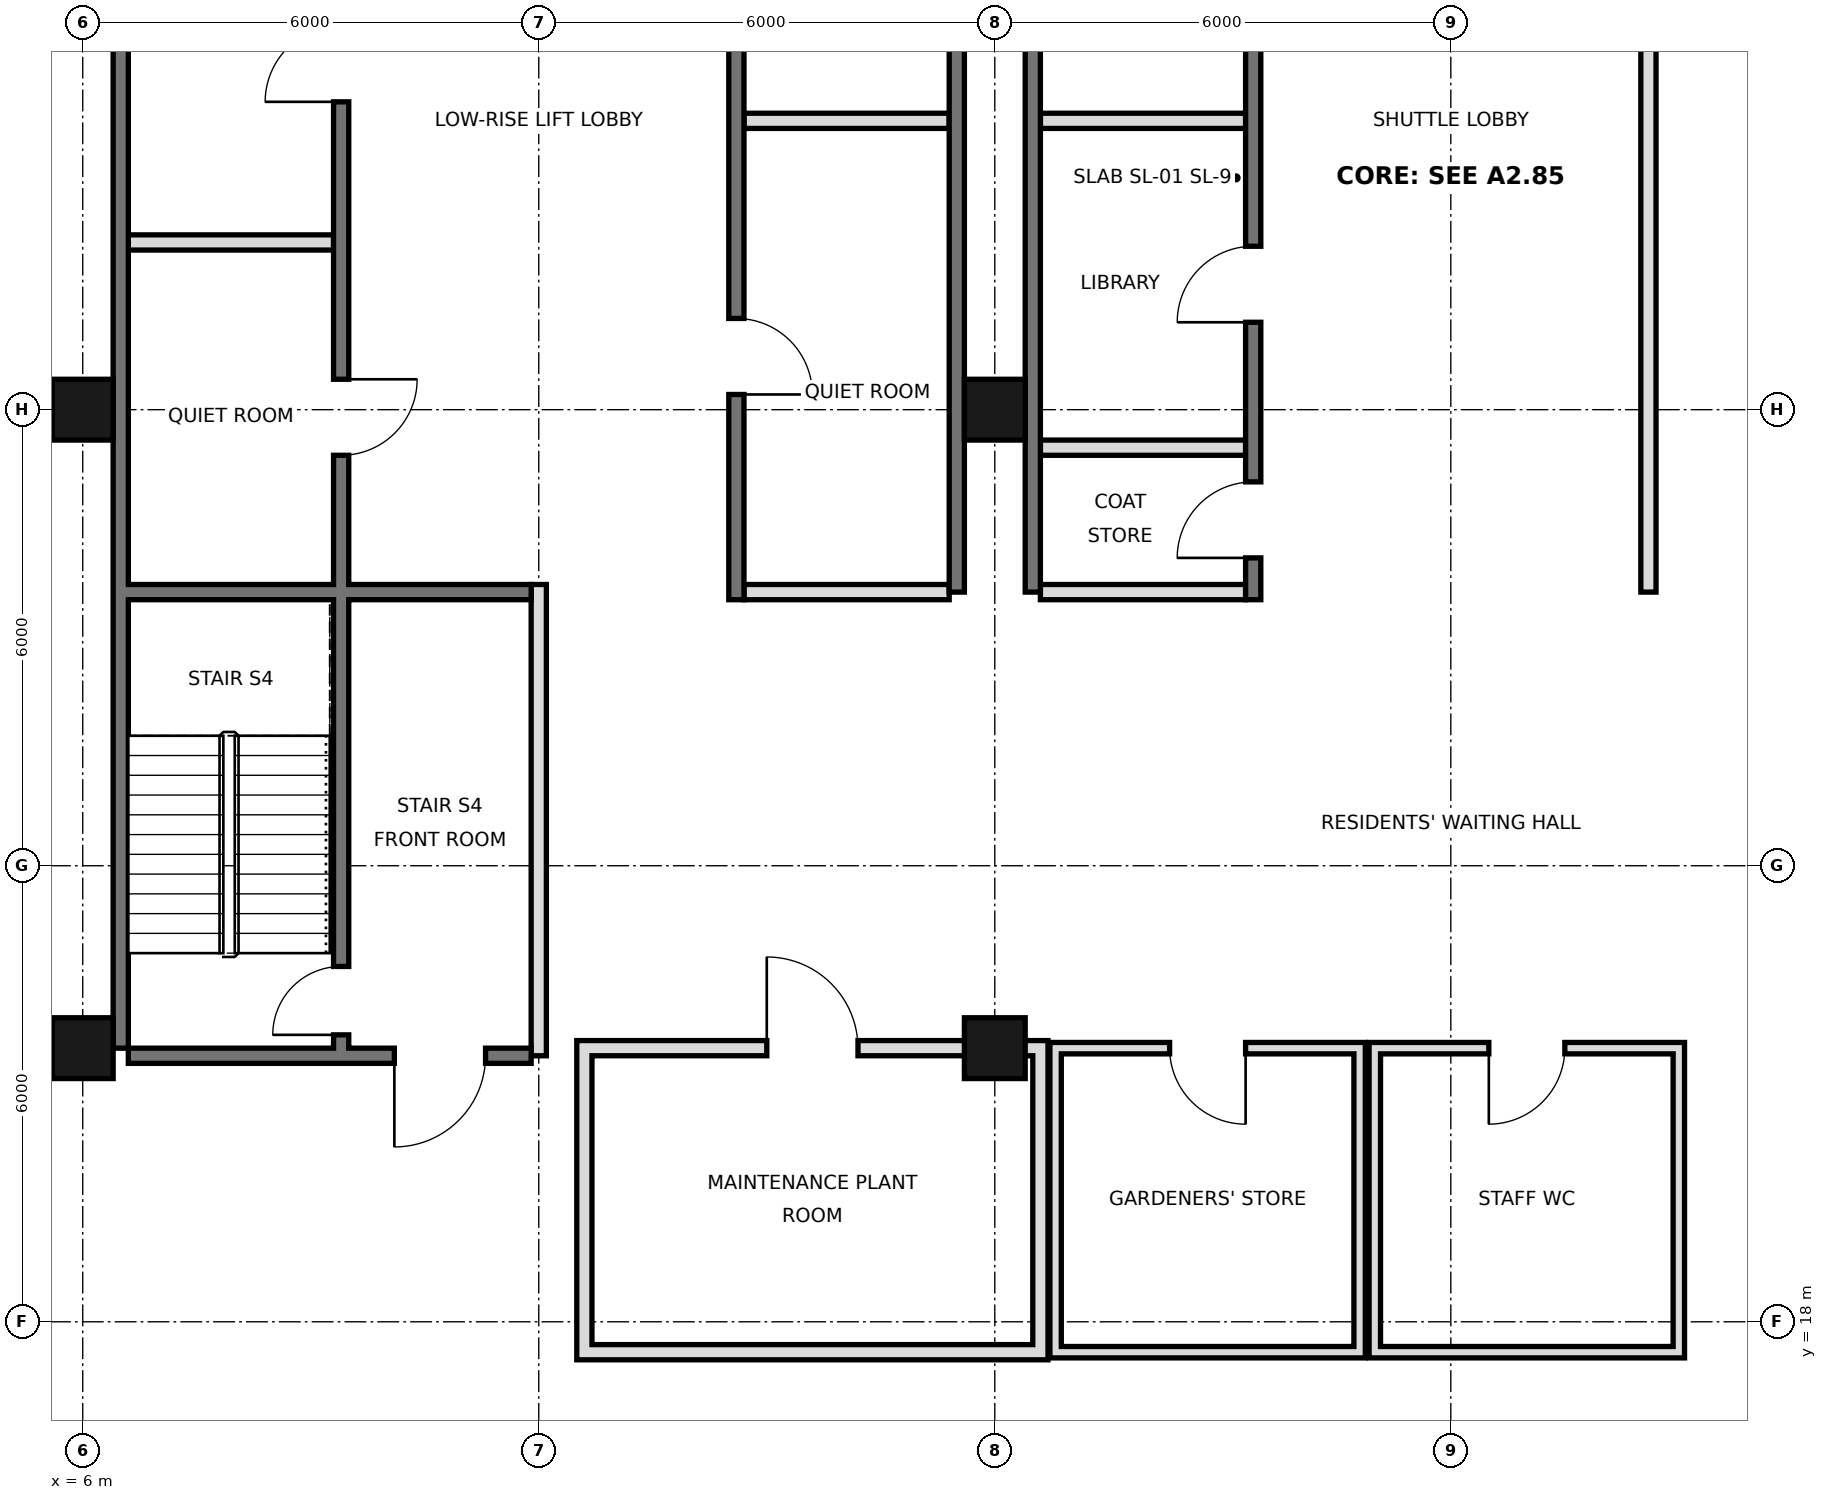
"""IFC4 building model, lengths in metres.
Left out: names, types, materials, properties, quantities, classifications, styles, units other than length and angle.
Written with IfcOpenShell. Run it as: python <this file> out.ifc"""

import sys

from ifc_helpers import new_model, si_unit, direction, frame, frame_2d, origin, origin_2d, place, context, subcontext, project, spatial, rectangle, hollow_rectangle, extrude, element, fill, save


model = new_model("IFC4")
c1 = context("Model", 3, precision=1e-05, world=origin(), true_north=direction((0.0, 1.0)))
c2 = subcontext(c1, "Body", "Model", "MODEL_VIEW")
j1 = project(units=[si_unit("LENGTHUNIT", "METRE"), si_unit("PLANEANGLEUNIT", "RADIAN")], contexts=[c1])
p1 = place(None, origin())
s1 = spatial("IfcSite", under=j1, at=p1, CompositionType="ELEMENT")
p2 = place(p1, origin())
s2 = spatial("IfcBuilding", under=s1, at=p2, CompositionType="ELEMENT")
p3 = place(p2, frame((0.0, 0.0, 341.8)))
s3 = spatial("IfcBuildingStorey", under=s2, at=p3, CompositionType="ELEMENT", Elevation=341.8)
for number, where, z_axis, x_axis in (
    (1, (6.0, 21.6, 0.0), (0.0, 0.0, 1.0), (1.0, 0.0, 0.0)),
    (2, (6.0, 30.0, 0.0), (0.0, 0.0, 1.0), (1.0, 0.0, 0.0)),
    (3, (18.0, 21.6, 0.0), (0.0, 0.0, 1.0), (1.0, 0.0, 0.0)),
    (4, (18.0, 30.0, 0.0), (0.0, 0.0, 1.0), (1.0, 0.0, 0.0)),
):
    element("IfcColumn", number, at=place(p3, frame(where, z_axis=z_axis, x_axis=x_axis)), inside=s3, PredefinedType="COLUMN", context=c2, shape_type="SweptSolid", body=[
        extrude(hollow_rectangle(XDim=0.8, YDim=0.8, WallThickness=0.025, at=origin_2d()), origin(), (0.0, 0.0, 1.0), 4.0),
    ])
for number, where, z_axis, x_axis in (
    (5, (12.6, 17.5, 0.0), (0.0, 0.0, 1.0), (0.0, 1.0, 0.0)),
    (6, (18.6, 17.5, 0.0), (0.0, 0.0, 1.0), (0.0, 1.0, 0.0)),
):
    element("IfcWall", number, at=place(p3, frame(where, z_axis=z_axis, x_axis=x_axis)), inside=s3, PredefinedType="SOLIDWALL", context=c2, shape_type="SweptSolid", body=[
        extrude(rectangle(XDim=4.2, YDim=0.2, at=frame_2d((2.1, 0.0))), origin(), (0.0, 0.0, 1.0), 3.05),
    ])
for number, where, z_axis, x_axis in (
    (7, (18.8, 17.525, 0.0), (0.0, 0.0, 1.0), (0.0, 1.0, 0.0)),
    (8, (22.8, 17.525, 0.0), (0.0, 0.0, 1.0), (0.0, 1.0, 0.0)),
    (9, (23.0, 17.525, 0.0), (0.0, 0.0, 1.0), (0.0, 1.0, 0.0)),
    (10, (27.0, 17.525, 0.0), (0.0, 0.0, 1.0), (0.0, 1.0, 0.0)),
):
    element("IfcWall", number, at=place(p3, frame(where, z_axis=z_axis, x_axis=x_axis)), inside=s3, PredefinedType="PARTITIONING", context=c2, shape_type="SweptSolid", body=[
        extrude(rectangle(XDim=4.15, YDim=0.15, at=frame_2d((2.075, 0.0))), origin(), (0.0, 0.0, 1.0), 3.75),
    ])
p4 = place(p3, frame((12.7, 17.6, 0.0), z_axis=(0.0, 0.0, 1.0), x_axis=(1.0, 0.0, 0.0)))
e11 = element("IfcWall", 11, at=p4, inside=s3, PredefinedType="SOLIDWALL", context=c2, shape_type="SweptSolid", body=[
    extrude(rectangle(XDim=5.8, YDim=0.2, at=frame_2d((2.9, 0.0))), origin(), (0.0, 0.0, 1.0), 3.05),
])
for number, where, z_axis, x_axis in (
    (12, (18.875, 17.6, 0.0), (0.0, 0.0, 1.0), (1.0, 0.0, 0.0)),
    (13, (23.075, 17.6, 0.0), (0.0, 0.0, 1.0), (1.0, 0.0, 0.0)),
):
    element("IfcWall", number, at=place(p3, frame(where, z_axis=z_axis, x_axis=x_axis)), inside=s3, PredefinedType="PARTITIONING", context=c2, shape_type="SweptSolid", body=[
        extrude(rectangle(XDim=3.85, YDim=0.15, at=frame_2d((1.925, 0.0))), origin(), (0.0, 0.0, 1.0), 3.75),
    ])
p5 = place(p3, frame((12.7, 21.6, 0.0), z_axis=(0.0, 0.0, 1.0), x_axis=(1.0, 0.0, 0.0)))
e14 = element("IfcWall", 14, at=p5, inside=s3, PredefinedType="SOLIDWALL", context=c2, shape_type="SweptSolid", body=[
    extrude(rectangle(XDim=5.8, YDim=0.2, at=frame_2d((2.9, 0.0))), origin(), (0.0, 0.0, 1.0), 3.75),
])
p6 = place(p5, frame((2.3, 0.0, 0.0)))
e15 = element("IfcOpeningElement", 15, at=p6, cuts=e14, PredefinedType="OPENING", context=c2, shape_type="SweptSolid", body=[
    extrude(rectangle(XDim=1.2, YDim=2.4, at=frame_2d((0.6, 1.2))), frame((0.0, 0.11, 0.0), z_axis=(0.0, -1.0, 0.0), x_axis=(1.0, 0.0, 0.0)), (0.0, 0.0, 1.0), 0.22),
])
p7 = place(p3, frame((18.875, 21.6, 0.0), z_axis=(0.0, 0.0, 1.0), x_axis=(1.0, 0.0, 0.0)))
e16 = element("IfcWall", 16, at=p7, inside=s3, PredefinedType="PARTITIONING", context=c2, shape_type="SweptSolid", body=[
    extrude(rectangle(XDim=3.85, YDim=0.15, at=frame_2d((1.925, 0.0))), origin(), (0.0, 0.0, 1.0), 3.75),
])
p8 = place(p7, frame((1.425, 0.0, 0.0)))
e17 = element("IfcOpeningElement", 17, at=p8, cuts=e16, PredefinedType="OPENING", context=c2, shape_type="SweptSolid", body=[
    extrude(rectangle(XDim=1.0, YDim=2.4, at=frame_2d((0.5, 1.2))), frame((0.0, 0.085, 0.0), z_axis=(0.0, -1.0, 0.0), x_axis=(1.0, 0.0, 0.0)), (0.0, 0.0, 1.0), 0.17),
])
p9 = place(p3, frame((23.075, 21.6, 0.0), z_axis=(0.0, 0.0, 1.0), x_axis=(1.0, 0.0, 0.0)))
e18 = element("IfcWall", 18, at=p9, inside=s3, PredefinedType="PARTITIONING", context=c2, shape_type="SweptSolid", body=[
    extrude(rectangle(XDim=3.85, YDim=0.15, at=frame_2d((1.925, 0.0))), origin(), (0.0, 0.0, 1.0), 3.75),
])
p10 = place(p9, frame((1.425, 0.0, 0.0)))
e19 = element("IfcOpeningElement", 19, at=p10, cuts=e18, PredefinedType="OPENING", context=c2, shape_type="SweptSolid", body=[
    extrude(rectangle(XDim=1.0, YDim=2.4, at=frame_2d((0.5, 1.2))), frame((0.0, 0.085, 0.0), z_axis=(0.0, -1.0, 0.0), x_axis=(1.0, 0.0, 0.0)), (0.0, 0.0, 1.0), 0.17),
])
p11 = place(p3, frame((6.5, 21.6, 0.0), z_axis=(0.0, 0.0, 1.0), x_axis=(0.0, 1.0, 0.0)))
e20 = element("IfcWall", 20, at=p11, inside=s3, PredefinedType="SOLIDWALL", context=c2, shape_type="SweptSolid", body=[
    extrude(rectangle(XDim=23.5, YDim=0.2, at=frame_2d((11.75, 0.0))), origin(), (0.0, 0.0, 1.0), 3.75),
])
for number, where, z_axis, x_axis in (
    (21, (17.5, 27.6, 0.0), (0.0, 0.0, 1.0), (0.0, 1.0, 0.0)),
    (22, (18.5, 27.6, 0.0), (0.0, 0.0, 1.0), (0.0, 1.0, 0.0)),
):
    element("IfcWall", number, at=place(p3, frame(where, z_axis=z_axis, x_axis=x_axis)), inside=s3, PredefinedType="SOLIDWALL", context=c2, shape_type="SweptSolid", body=[
        extrude(rectangle(XDim=17.5, YDim=0.2, at=frame_2d((8.75, 0.0))), origin(), (0.0, 0.0, 1.0), 3.75),
    ])
p12 = place(p3, frame((12.0, 21.5, 0.0), z_axis=(0.0, 0.0, 1.0), x_axis=(0.0, 1.0, 0.0)))
e23 = element("IfcWall", 23, at=p12, inside=s3, PredefinedType="PARTITIONING", context=c2, shape_type="SweptSolid", body=[
    extrude(rectangle(XDim=6.2, YDim=0.2, at=frame_2d((3.1, 0.0))), origin(), (0.0, 0.0, 1.0), 3.75),
])
p13 = place(p3, frame((14.6, 27.5, 0.0), z_axis=(0.0, 0.0, 1.0), x_axis=(0.0, 1.0, 0.0)))
e24 = element("IfcWall", 24, at=p13, inside=s3, PredefinedType="SOLIDWALL", context=c2, shape_type="SweptSolid", body=[
    extrude(rectangle(XDim=17.5, YDim=0.2, at=frame_2d((8.75, 0.0))), origin(), (0.0, 0.0, 1.0), 3.75),
])
p14 = place(p13, frame((15.4, 0.0, 0.0)))
e25 = element("IfcOpeningElement", 25, at=p14, cuts=e24, PredefinedType="OPENING", context=c2, shape_type="SweptSolid", body=[
    extrude(rectangle(XDim=1.1, YDim=2.1, at=frame_2d((0.55, 1.05))), frame((0.0, 0.11, 0.0), z_axis=(0.0, -1.0, 0.0), x_axis=(1.0, 0.0, 0.0)), (0.0, 0.0, 1.0), 0.22),
])
p15 = place(p13, frame((2.7, 0.0, 0.0)))
e26 = element("IfcOpeningElement", 26, at=p15, cuts=e24, PredefinedType="OPENING", context=c2, shape_type="SweptSolid", body=[
    extrude(rectangle(XDim=1.0, YDim=2.1, at=frame_2d((0.5, 1.05))), frame((0.0, 0.11, 0.0), z_axis=(0.0, -1.0, 0.0), x_axis=(1.0, 0.0, 0.0)), (0.0, 0.0, 1.0), 0.22),
])
p16 = place(p3, frame((21.4, 27.5, 0.0), z_axis=(0.0, 0.0, 1.0), x_axis=(0.0, 1.0, 0.0)))
e27 = element("IfcWall", 27, at=p16, inside=s3, PredefinedType="SOLIDWALL", context=c2, shape_type="SweptSolid", body=[
    extrude(rectangle(XDim=17.5, YDim=0.2, at=frame_2d((8.75, 0.0))), origin(), (0.0, 0.0, 1.0), 3.75),
])
p17 = place(p16, frame((0.55, 0.0, 0.0)))
e28 = element("IfcOpeningElement", 28, at=p17, cuts=e27, PredefinedType="OPENING", context=c2, shape_type="SweptSolid", body=[
    extrude(rectangle(XDim=1.0, YDim=2.1, at=frame_2d((0.5, 1.05))), frame((0.0, 0.11, 0.0), z_axis=(0.0, -1.0, 0.0), x_axis=(1.0, 0.0, 0.0)), (0.0, 0.0, 1.0), 0.22),
])
p18 = place(p16, frame((3.65, 0.0, 0.0)))
e29 = element("IfcOpeningElement", 29, at=p18, cuts=e27, PredefinedType="OPENING", context=c2, shape_type="SweptSolid", body=[
    extrude(rectangle(XDim=1.0, YDim=2.1, at=frame_2d((0.5, 1.05))), frame((0.0, 0.11, 0.0), z_axis=(0.0, -1.0, 0.0), x_axis=(1.0, 0.0, 0.0)), (0.0, 0.0, 1.0), 0.22),
])
p19 = place(p16, frame((9.8, 0.0, 0.0)))
e30 = element("IfcOpeningElement", 30, at=p19, cuts=e27, PredefinedType="OPENING", context=c2, shape_type="SweptSolid", body=[
    extrude(rectangle(XDim=1.0, YDim=2.1, at=frame_2d((0.5, 1.05))), frame((0.0, 0.11, 0.0), z_axis=(0.0, -1.0, 0.0), x_axis=(1.0, 0.0, 0.0)), (0.0, 0.0, 1.0), 0.22),
])
p20 = place(p3, frame((26.6, 27.6, 0.0), z_axis=(0.0, 0.0, 1.0), x_axis=(0.0, 1.0, 0.0)))
e31 = element("IfcWall", 31, at=p20, inside=s3, PredefinedType="PARTITIONING", context=c2, shape_type="SweptSolid", body=[
    extrude(rectangle(XDim=17.4, YDim=0.2, at=frame_2d((8.7, 0.0))), origin(), (0.0, 0.0, 1.0), 3.75),
])
p21 = place(p20, frame((10.25, 0.0, 0.0)))
e32 = element("IfcOpeningElement", 32, at=p21, cuts=e31, PredefinedType="OPENING", context=c2, shape_type="SweptSolid", body=[
    extrude(rectangle(XDim=1.0, YDim=2.1, at=frame_2d((0.5, 1.05))), frame((0.0, 0.11, 0.0), z_axis=(0.0, -1.0, 0.0), x_axis=(1.0, 0.0, 0.0)), (0.0, 0.0, 1.0), 0.22),
])
p22 = place(p20, frame((14.475, 0.0, 0.0)))
e33 = element("IfcOpeningElement", 33, at=p22, cuts=e31, PredefinedType="OPENING", context=c2, shape_type="SweptSolid", body=[
    extrude(rectangle(XDim=1.0, YDim=2.1, at=frame_2d((0.5, 1.05))), frame((0.0, 0.11, 0.0), z_axis=(0.0, -1.0, 0.0), x_axis=(1.0, 0.0, 0.0)), (0.0, 0.0, 1.0), 0.22),
])
p23 = place(p3, frame((9.4, 21.5, 0.0), z_axis=(0.0, 0.0, 1.0), x_axis=(0.0, 1.0, 0.0)))
e34 = element("IfcWall", 34, at=p23, inside=s3, PredefinedType="SOLIDWALL", context=c2, shape_type="SweptSolid", body=[
    extrude(rectangle(XDim=23.5, YDim=0.2, at=frame_2d((11.75, 0.0))), origin(), (0.0, 0.0, 1.0), 3.75),
])
p24 = place(p23, frame((7.9, 0.0, 0.0)))
e35 = element("IfcOpeningElement", 35, at=p24, cuts=e34, PredefinedType="OPENING", context=c2, shape_type="SweptSolid", body=[
    extrude(rectangle(XDim=1.0, YDim=2.1, at=frame_2d((0.5, 1.05))), frame((0.0, 0.11, 0.0), z_axis=(0.0, -1.0, 0.0), x_axis=(1.0, 0.0, 0.0)), (0.0, 0.0, 1.0), 0.22),
])
p25 = place(p23, frame((12.55, 0.0, 0.0)))
e36 = element("IfcOpeningElement", 36, at=p25, cuts=e34, PredefinedType="OPENING", context=c2, shape_type="SweptSolid", body=[
    extrude(rectangle(XDim=1.0, YDim=2.1, at=frame_2d((0.5, 1.05))), frame((0.0, 0.11, 0.0), z_axis=(0.0, -1.0, 0.0), x_axis=(1.0, 0.0, 0.0)), (0.0, 0.0, 1.0), 0.22),
])
p26 = place(p23, frame((15.8, 0.0, 0.0)))
e37 = element("IfcOpeningElement", 37, at=p26, cuts=e34, PredefinedType="OPENING", context=c2, shape_type="SweptSolid", body=[
    extrude(rectangle(XDim=1.0, YDim=2.1, at=frame_2d((0.5, 1.05))), frame((0.0, 0.11, 0.0), z_axis=(0.0, -1.0, 0.0), x_axis=(1.0, 0.0, 0.0)), (0.0, 0.0, 1.0), 0.22),
])
p27 = place(p23, frame((0.275, 0.0, 0.0)))
e38 = element("IfcOpeningElement", 38, at=p27, cuts=e34, PredefinedType="OPENING", context=c2, shape_type="SweptSolid", body=[
    extrude(rectangle(XDim=0.9, YDim=2.1, at=frame_2d((0.45, 1.05))), frame((0.0, 0.11, 0.0), z_axis=(0.0, -1.0, 0.0), x_axis=(1.0, 0.0, 0.0)), (0.0, 0.0, 1.0), 0.22),
])
p28 = place(p3, frame((6.6, 21.5, 0.0), z_axis=(0.0, 0.0, 1.0), x_axis=(1.0, 0.0, 0.0)))
e39 = element("IfcWall", 39, at=p28, inside=s3, PredefinedType="SOLIDWALL", context=c2, shape_type="SweptSolid", body=[
    extrude(rectangle(XDim=5.3, YDim=0.2, at=frame_2d((2.65, 0.0))), origin(), (0.0, 0.0, 1.0), 3.75),
])
p29 = place(p28, frame((3.5, 0.0, 0.0)))
e40 = element("IfcOpeningElement", 40, at=p29, cuts=e39, PredefinedType="OPENING", context=c2, shape_type="SweptSolid", body=[
    extrude(rectangle(XDim=1.2, YDim=2.1, at=frame_2d((0.6, 1.05))), frame((0.0, 0.11, 0.0), z_axis=(0.0, -1.0, 0.0), x_axis=(1.0, 0.0, 0.0)), (0.0, 0.0, 1.0), 0.22),
])
for number, where, z_axis, x_axis in (
    (41, (14.7, 27.6, 0.0), (0.0, 0.0, 1.0), (1.0, 0.0, 0.0)),
    (42, (18.6, 27.6, 0.0), (0.0, 0.0, 1.0), (1.0, 0.0, 0.0)),
):
    element("IfcWall", number, at=place(p3, frame(where, z_axis=z_axis, x_axis=x_axis)), inside=s3, PredefinedType="PARTITIONING", context=c2, shape_type="SweptSolid", body=[
        extrude(rectangle(XDim=2.7, YDim=0.2, at=frame_2d((1.35, 0.0))), origin(), (0.0, 0.0, 1.0), 3.75),
    ])
p30 = place(p3, frame((6.6, 27.6, 0.0), z_axis=(0.0, 0.0, 1.0), x_axis=(1.0, 0.0, 0.0)))
e43 = element("IfcWall", 43, at=p30, inside=s3, PredefinedType="SOLIDWALL", context=c2, shape_type="SweptSolid", body=[
    extrude(rectangle(XDim=5.3, YDim=0.2, at=frame_2d((2.65, 0.0))), origin(), (0.0, 0.0, 1.0), 3.75),
])
for number, where, z_axis, x_axis in (
    (44, (18.6, 29.5, 0.0), (0.0, 0.0, 1.0), (1.0, 0.0, 0.0)),
    (45, (6.6, 32.2, 0.0), (0.0, 0.0, 1.0), (1.0, 0.0, 0.0)),
    (46, (14.7, 33.8, 0.0), (0.0, 0.0, 1.0), (1.0, 0.0, 0.0)),
    (47, (18.6, 33.8, 0.0), (0.0, 0.0, 1.0), (1.0, 0.0, 0.0)),
):
    element("IfcWall", number, at=place(p3, frame(where, z_axis=z_axis, x_axis=x_axis)), inside=s3, PredefinedType="PARTITIONING", context=c2, shape_type="SweptSolid", body=[
        extrude(rectangle(XDim=2.7, YDim=0.2, at=frame_2d((1.35, 0.0))), origin(), (0.0, 0.0, 1.0), 3.75),
    ])
p31 = place(p6, origin())
e48 = element("IfcDoor", 48, at=p31, inside=s3, OperationType="SINGLE_SWING_LEFT", PredefinedType="DOOR", context=c2, shape_type="SweptSolid", body=[
    extrude(rectangle(XDim=1.2, YDim=2.4, at=frame_2d((0.6, 1.2))), frame((0.0, 0.025, 0.0), z_axis=(0.0, -1.0, 0.0), x_axis=(1.0, 0.0, 0.0)), (0.0, 0.0, 1.0), 0.05),
])
fill(e15, e48)
p32 = place(p8, origin())
e49 = element("IfcDoor", 49, at=p32, inside=s3, OperationType="SINGLE_SWING_RIGHT", PredefinedType="DOOR", context=c2, shape_type="SweptSolid", body=[
    extrude(rectangle(XDim=1.0, YDim=2.4, at=frame_2d((0.5, 1.2))), frame((0.0, 0.025, 0.0), z_axis=(0.0, -1.0, 0.0), x_axis=(1.0, 0.0, 0.0)), (0.0, 0.0, 1.0), 0.05),
])
fill(e17, e49)
p33 = place(p10, frame((1.0, 0.0, 0.0), z_axis=(0.0, 0.0, 1.0), x_axis=(-1.0, 0.0, 0.0)))
e50 = element("IfcDoor", 50, at=p33, inside=s3, OperationType="SINGLE_SWING_RIGHT", PredefinedType="DOOR", context=c2, shape_type="SweptSolid", body=[
    extrude(rectangle(XDim=1.0, YDim=2.4, at=frame_2d((0.5, 1.2))), frame((0.0, 0.025, 0.0), z_axis=(0.0, -1.0, 0.0), x_axis=(1.0, 0.0, 0.0)), (0.0, 0.0, 1.0), 0.05),
])
fill(e19, e50)
p34 = place(p29, frame((1.2, 0.0, 0.0), z_axis=(0.0, 0.0, 1.0), x_axis=(-1.0, 0.0, 0.0)))
e51 = element("IfcDoor", 51, at=p34, inside=s3, OperationType="SINGLE_SWING_RIGHT", PredefinedType="DOOR", context=c2, shape_type="SweptSolid", body=[
    extrude(rectangle(XDim=1.2, YDim=2.1, at=frame_2d((0.6, 1.05))), frame((0.0, 0.025, 0.0), z_axis=(0.0, -1.0, 0.0), x_axis=(1.0, 0.0, 0.0)), (0.0, 0.0, 1.0), 0.05),
])
fill(e40, e51)
p35 = place(p17, origin())
e52 = element("IfcDoor", 52, at=p35, inside=s3, OperationType="SINGLE_SWING_LEFT", PredefinedType="DOOR", context=c2, shape_type="SweptSolid", body=[
    extrude(rectangle(XDim=1.0, YDim=2.1, at=frame_2d((0.5, 1.05))), frame((0.0, 0.025, 0.0), z_axis=(0.0, -1.0, 0.0), x_axis=(1.0, 0.0, 0.0)), (0.0, 0.0, 1.0), 0.05),
])
fill(e28, e52)
p36 = place(p18, origin())
e53 = element("IfcDoor", 53, at=p36, inside=s3, OperationType="SINGLE_SWING_LEFT", PredefinedType="DOOR", context=c2, shape_type="SweptSolid", body=[
    extrude(rectangle(XDim=1.0, YDim=2.1, at=frame_2d((0.5, 1.05))), frame((0.0, 0.025, 0.0), z_axis=(0.0, -1.0, 0.0), x_axis=(1.0, 0.0, 0.0)), (0.0, 0.0, 1.0), 0.05),
])
fill(e29, e53)
p37 = place(p15, frame((1.0, 0.0, 0.0), z_axis=(0.0, 0.0, 1.0), x_axis=(-1.0, 0.0, 0.0)))
e54 = element("IfcDoor", 54, at=p37, inside=s3, OperationType="SINGLE_SWING_RIGHT", PredefinedType="DOOR", context=c2, shape_type="SweptSolid", body=[
    extrude(rectangle(XDim=1.0, YDim=2.1, at=frame_2d((0.5, 1.05))), frame((0.0, 0.025, 0.0), z_axis=(0.0, -1.0, 0.0), x_axis=(1.0, 0.0, 0.0)), (0.0, 0.0, 1.0), 0.05),
])
fill(e26, e54)
p38 = place(p24, origin())
e55 = element("IfcDoor", 55, at=p38, inside=s3, OperationType="SINGLE_SWING_RIGHT", PredefinedType="DOOR", context=c2, shape_type="SweptSolid", body=[
    extrude(rectangle(XDim=1.0, YDim=2.1, at=frame_2d((0.5, 1.05))), frame((0.0, 0.025, 0.0), z_axis=(0.0, -1.0, 0.0), x_axis=(1.0, 0.0, 0.0)), (0.0, 0.0, 1.0), 0.05),
])
fill(e35, e55)
p39 = place(p25, origin())
e56 = element("IfcDoor", 56, at=p39, inside=s3, OperationType="SINGLE_SWING_LEFT", PredefinedType="DOOR", context=c2, shape_type="SweptSolid", body=[
    extrude(rectangle(XDim=1.0, YDim=2.1, at=frame_2d((0.5, 1.05))), frame((0.0, 0.025, 0.0), z_axis=(0.0, -1.0, 0.0), x_axis=(1.0, 0.0, 0.0)), (0.0, 0.0, 1.0), 0.05),
])
fill(e36, e56)
p40 = place(p27, origin())
e57 = element("IfcDoor", 57, at=p40, inside=s3, OperationType="SINGLE_SWING_LEFT", PredefinedType="DOOR", context=c2, shape_type="SweptSolid", body=[
    extrude(rectangle(XDim=0.9, YDim=2.1, at=frame_2d((0.45, 1.05))), frame((0.0, 0.025, 0.0), z_axis=(0.0, -1.0, 0.0), x_axis=(1.0, 0.0, 0.0)), (0.0, 0.0, 1.0), 0.05),
])
fill(e38, e57)
save(model, sys.argv[1])
